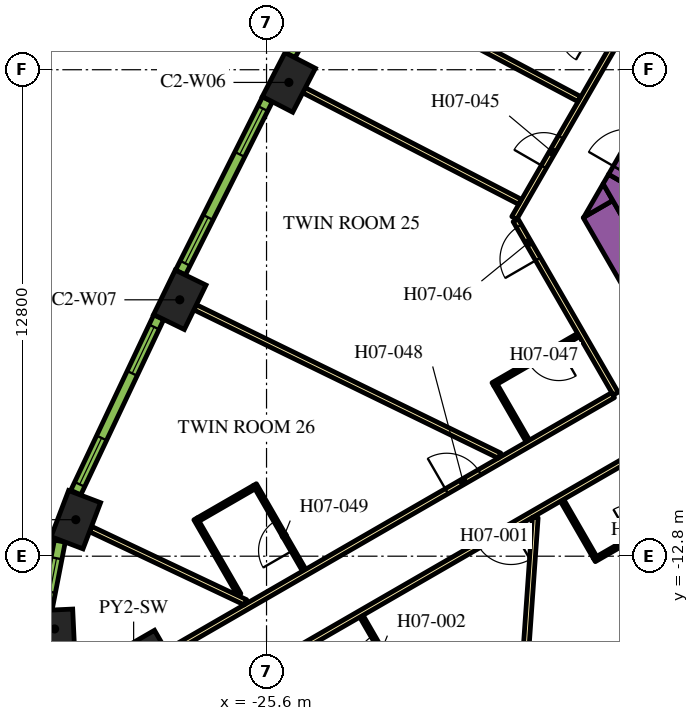
"""IFC4 building model, lengths in metres.
Left out: names, types, materials, properties, quantities, classifications, styles, units other than length and angle.
Written with IfcOpenShell. Run it as: python <this file> out.ifc"""

import sys

from ifc_helpers import new_model, si_unit, direction, frame, frame_2d, origin, origin_2d, place, context, subcontext, project, spatial, polyline, rectangle, outline, extrude, element, fill, save


model = new_model("IFC4")
c1 = context("Model", 3, precision=1e-05, world=origin(), true_north=direction((0.0, 1.0)))
c2 = subcontext(c1, "Body", "Model", "MODEL_VIEW")
j1 = project(units=[si_unit("LENGTHUNIT", "METRE"), si_unit("PLANEANGLEUNIT", "RADIAN")], contexts=[c1])
p1 = place(None, origin())
s1 = spatial("IfcSite", under=j1, at=p1, CompositionType="ELEMENT")
p2 = place(p1, origin())
s2 = spatial("IfcBuilding", under=s1, at=p2, CompositionType="ELEMENT")
p3 = place(p2, frame((0.0, 0.0, 99.3)))
s3 = spatial("IfcBuildingStorey", under=s2, at=p3, CompositionType="ELEMENT", Elevation=99.3)
p4 = place(p3, frame((-29.097, -16.799, 0.0), z_axis=(0.0, 0.0, 1.0), x_axis=(-0.866025403784, -0.5, 0.0)))
e1 = element("IfcColumn", 1, at=p4, inside=s3, PredefinedType="COLUMN", context=c2, shape_type="SweptSolid", body=[
    extrude(rectangle(XDim=3.0, YDim=3.0, at=origin_2d()), origin(), (0.0, 0.0, 1.0), 3.9),
])
for number, where, z_axis, x_axis in (
    (2, (-25.012, -0.334, 0.0), (0.0, 0.0, 1.0), (-0.459, -0.888, 0.0)),
    (3, (-27.883, -6.054, 0.0), (0.0, 0.0, 1.0), (-0.438, -0.899, 0.0)),
    (4, (-30.619, -11.839, 0.0), (0.0, 0.0, 1.0), (-0.355, -0.935, 0.0)),
):
    element("IfcColumn", number, at=place(p3, frame(where, z_axis=z_axis, x_axis=x_axis)), inside=s3, PredefinedType="COLUMN", context=c2, shape_type="SweptSolid", body=[
        extrude(rectangle(XDim=1.3, YDim=0.9, at=origin_2d()), origin(), (0.0, 0.0, 1.0), 3.9),
    ])
p5 = place(p3, frame((-31.177, -14.714, 0.0), z_axis=(0.0, 0.0, 1.0), x_axis=(0.046756026083, -0.998906338965, 0.0)))
e5 = element("IfcColumn", 5, at=p5, inside=s3, PredefinedType="COLUMN", context=c2, shape_type="SweptSolid", body=[
    extrude(rectangle(XDim=1.0, YDim=1.0, at=origin_2d()), origin(), (0.0, 0.0, 1.0), 3.9),
])
p6 = place(p3, frame((-12.134, -11.883, 0.0), z_axis=(0.0, 0.0, 1.0), x_axis=(-0.500005339912, 0.866022320763, 0.0)))
e6 = element("IfcWall", 6, at=p6, inside=s3, PredefinedType="SOLIDWALL", context=c2, shape_type="SweptSolid", body=[
    extrude(rectangle(XDim=9.488, YDim=0.9, at=frame_2d((4.744, 0.0))), origin(), (0.0, 0.0, 1.0), 3.9),
])
p7 = place(p3, origin())
e7 = element("IfcWall", 7, at=p7, inside=s3, PredefinedType="SOLIDWALL", context=c2, shape_type="SweptSolid", body=[
    extrude(outline(polyline([(-16.489, -3.44), (-17.251, -3.88), (-16.743, -3.0), (-16.489, -3.44)])), origin(), (0.0, 0.0, 1.0), 3.9),
])
e8 = element("IfcWall", 8, at=p7, inside=s3, PredefinedType="SOLIDWALL", context=c2, shape_type="SweptSolid", body=[
    extrude(outline(polyline([(-15.82, -3.201), (-16.223, -3.9), (-16.743, -3.0), (-16.599, -2.751), (-15.82, -3.201)])), origin(), (0.0, 0.0, 1.0), 3.9),
])
p8 = place(p3, frame((-16.209, -2.976, 0.0), z_axis=(0.0, 0.0, 1.0), x_axis=(0.499954529098, 0.86605165483, 0.0)))
e9 = element("IfcWall", 9, at=p8, inside=s3, PredefinedType="SOLIDWALL", context=c2, shape_type="SweptSolid", body=[
    extrude(rectangle(XDim=1.7, YDim=0.9, at=frame_2d((0.85, 0.0))), origin(), (0.0, 0.0, 1.0), 3.9),
])
p9 = place(p8, frame((0.25, 0.0, 0.0)))
e10 = element("IfcOpeningElement", 10, at=p9, cuts=e9, PredefinedType="OPENING", context=c2, shape_type="SweptSolid", body=[
    extrude(rectangle(XDim=1.2, YDim=2.1, at=frame_2d((0.6, 1.05))), frame((0.0, 0.46, 0.0), z_axis=(0.0, -1.0, 0.0), x_axis=(1.0, 0.0, 0.0)), (0.0, 0.0, 1.0), 0.92),
])
p10 = place(p3, frame((-19.081, -3.9, 0.0), z_axis=(0.0, 0.0, 1.0), x_axis=(0.499998313975, 0.866026377209, 0.0)))
e11 = element("IfcWall", 11, at=p10, inside=s3, PredefinedType="PARTITIONING", context=c2, shape_type="SweptSolid", body=[
    extrude(rectangle(XDim=25.766, YDim=0.15, at=frame_2d((12.883, 0.0))), origin(), (0.0, 0.0, 1.0), 2.75),
])
p11 = place(p10, frame((19.306, 0.0, 0.0)))
e12 = element("IfcOpeningElement", 12, at=p11, cuts=e11, PredefinedType="OPENING", context=c2, shape_type="SweptSolid", body=[
    extrude(rectangle(XDim=1.0, YDim=2.1, at=frame_2d((0.5, 1.05))), frame((0.0, 0.085, 0.0), z_axis=(0.0, -1.0, 0.0), x_axis=(1.0, 0.0, 0.0)), (0.0, 0.0, 1.0), 0.17),
])
p12 = place(p10, frame((17.144, 0.0, 0.0)))
e13 = element("IfcOpeningElement", 13, at=p12, cuts=e11, PredefinedType="OPENING", context=c2, shape_type="SweptSolid", body=[
    extrude(rectangle(XDim=0.9, YDim=2.1, at=frame_2d((0.45, 1.05))), frame((0.0, 0.085, 0.0), z_axis=(0.0, -1.0, 0.0), x_axis=(1.0, 0.0, 0.0)), (0.0, 0.0, 1.0), 0.17),
])
p13 = place(p10, frame((9.955, 0.0, 0.0)))
e14 = element("IfcOpeningElement", 14, at=p13, cuts=e11, PredefinedType="OPENING", context=c2, shape_type="SweptSolid", body=[
    extrude(rectangle(XDim=1.1, YDim=2.1, at=frame_2d((0.55, 1.05))), frame((0.0, 0.085, 0.0), z_axis=(0.0, -1.0, 0.0), x_axis=(1.0, 0.0, 0.0)), (0.0, 0.0, 1.0), 0.17),
])
p14 = place(p10, frame((8.648, 0.0, 0.0)))
e15 = element("IfcOpeningElement", 15, at=p14, cuts=e11, PredefinedType="OPENING", context=c2, shape_type="SweptSolid", body=[
    extrude(rectangle(XDim=1.0, YDim=2.1, at=frame_2d((0.5, 1.05))), frame((0.0, 0.085, 0.0), z_axis=(0.0, -1.0, 0.0), x_axis=(1.0, 0.0, 0.0)), (0.0, 0.0, 1.0), 0.17),
])
p15 = place(p10, frame((1.553, 0.0, 0.0)))
e16 = element("IfcOpeningElement", 16, at=p15, cuts=e11, PredefinedType="OPENING", context=c2, shape_type="SweptSolid", body=[
    extrude(rectangle(XDim=0.9, YDim=2.1, at=frame_2d((0.45, 1.05))), frame((0.0, 0.085, 0.0), z_axis=(0.0, -1.0, 0.0), x_axis=(1.0, 0.0, 0.0)), (0.0, 0.0, 1.0), 0.17),
])
p16 = place(p3, frame((-16.412, -8.523, 0.0), z_axis=(0.0, 0.0, 1.0), x_axis=(-0.500001929737, 0.866024289647, 0.0)))
e17 = element("IfcWall", 17, at=p16, inside=s3, PredefinedType="PARTITIONING", context=c2, shape_type="SweptSolid", body=[
    extrude(rectangle(XDim=5.268, YDim=0.15, at=frame_2d((2.634, 0.0))), origin(), (0.0, 0.0, 1.0), 2.75),
])
p17 = place(p16, frame((4.088, 0.0, 0.0)))
e18 = element("IfcOpeningElement", 18, at=p17, cuts=e17, PredefinedType="OPENING", context=c2, shape_type="SweptSolid", body=[
    extrude(rectangle(XDim=1.0, YDim=2.1, at=frame_2d((0.5, 1.05))), frame((0.0, 0.085, 0.0), z_axis=(0.0, -1.0, 0.0), x_axis=(1.0, 0.0, 0.0)), (0.0, 0.0, 1.0), 0.17),
])
p18 = place(p3, frame((-28.211, -15.335, 0.0), z_axis=(0.0, 0.0, 1.0), x_axis=(0.866025884867, 0.49999916674, 0.0)))
e19 = element("IfcWall", 19, at=p18, inside=s3, PredefinedType="PARTITIONING", context=c2, shape_type="SweptSolid", body=[
    extrude(rectangle(XDim=13.543, YDim=0.15, at=frame_2d((6.772, 0.0))), origin(), (0.0, 0.0, 1.0), 2.75),
])
p19 = place(p18, frame((8.488, 0.0, 0.0)))
e20 = element("IfcOpeningElement", 20, at=p19, cuts=e19, PredefinedType="OPENING", context=c2, shape_type="SweptSolid", body=[
    extrude(rectangle(XDim=1.0, YDim=2.1, at=frame_2d((0.5, 1.05))), frame((0.0, 0.085, 0.0), z_axis=(0.0, -1.0, 0.0), x_axis=(1.0, 0.0, 0.0)), (0.0, 0.0, 1.0), 0.17),
])
p20 = place(p3, frame((-15.587, -9.952, 0.0), z_axis=(0.0, 0.0, 1.0), x_axis=(-0.866017869832, -0.500013048961, 0.0)))
e21 = element("IfcWall", 21, at=p20, inside=s3, PredefinedType="PARTITIONING", context=c2, shape_type="SweptSolid", body=[
    extrude(rectangle(XDim=13.624, YDim=0.15, at=frame_2d((6.812, 0.0))), origin(), (0.0, 0.0, 1.0), 2.75),
])
p21 = place(p20, frame((4.134, 0.0, 0.0)))
e22 = element("IfcOpeningElement", 22, at=p21, cuts=e21, PredefinedType="OPENING", context=c2, shape_type="SweptSolid", body=[
    extrude(rectangle(XDim=1.0, YDim=2.1, at=frame_2d((0.5, 1.05))), frame((0.0, 0.085, 0.0), z_axis=(0.0, -1.0, 0.0), x_axis=(1.0, 0.0, 0.0)), (0.0, 0.0, 1.0), 0.17),
])
p22 = place(p3, frame((-30.231, -12.085, 0.0), z_axis=(0.0, 0.0, 1.0), x_axis=(0.904001132572, -0.427530060122, 0.0)))
e23 = element("IfcWall", 23, at=p22, inside=s3, PredefinedType="PARTITIONING", context=c2, shape_type="SweptSolid", body=[
    extrude(rectangle(XDim=4.51, YDim=0.15, at=frame_2d((2.255, 0.0))), origin(), (0.0, 0.0, 1.0), 2.75),
])
p23 = place(p3, frame((-27.479, -6.251, 0.0), z_axis=(0.0, 0.0, 1.0), x_axis=(0.898945877276, -0.438059710231, 0.0)))
e24 = element("IfcWall", 24, at=p23, inside=s3, PredefinedType="PARTITIONING", context=c2, shape_type="SweptSolid", body=[
    extrude(rectangle(XDim=8.909, YDim=0.15, at=frame_2d((4.455, 0.0))), origin(), (0.0, 0.0, 1.0), 2.75),
])
p24 = place(p3, frame((-24.613, -0.541, 0.0), z_axis=(0.0, 0.0, 1.0), x_axis=(0.888459912519, -0.458954228487, 0.0)))
e25 = element("IfcWall", 25, at=p24, inside=s3, PredefinedType="PARTITIONING", context=c2, shape_type="SweptSolid", body=[
    extrude(rectangle(XDim=6.392, YDim=0.15, at=frame_2d((3.196, 0.0))), origin(), (0.0, 0.0, 1.0), 2.75),
])
p25 = place(p3, frame((-19.153, -20.671, 0.0), z_axis=(0.0, 0.0, 1.0), x_axis=(0.070070736723, 0.997542025107, 0.0)))
e26 = element("IfcWall", 26, at=p25, inside=s3, PredefinedType="PARTITIONING", context=c2, shape_type="SweptSolid", body=[
    extrude(rectangle(XDim=8.909, YDim=0.15, at=frame_2d((4.455, 0.0))), origin(), (0.0, 0.0, 1.0), 2.75),
])
p26 = place(p3, frame((-23.652, 2.567, 0.0), z_axis=(0.0, 0.0, 1.0), x_axis=(0.883019237957, -0.469336793144, 0.0)))
e27 = element("IfcWall", 27, at=p26, inside=s3, PredefinedType="PARTITIONING", context=c2, shape_type="SweptSolid", body=[
    extrude(rectangle(XDim=7.111, YDim=0.15, at=frame_2d((3.555, 0.0))), origin(), (0.0, 0.0, 1.0), 2.75),
])
p27 = place(p3, frame((-21.704, -16.803, 0.0), z_axis=(0.0, 0.0, 1.0), x_axis=(-0.500049511043, 0.865996816683, 0.0)))
e28 = element("IfcWall", 28, at=p27, inside=s3, PredefinedType="PARTITIONING", context=c2, shape_type="SweptSolid", body=[
    extrude(rectangle(XDim=2.8, YDim=0.1, at=frame_2d((1.4, 0.0))), origin(), (0.0, 0.0, 1.0), 2.75),
])
p28 = place(p27, frame((1.3, 0.0, 0.0)))
e29 = element("IfcOpeningElement", 29, at=p28, cuts=e28, PredefinedType="OPENING", context=c2, shape_type="SweptSolid", body=[
    extrude(rectangle(XDim=0.9, YDim=2.1, at=frame_2d((0.45, 1.05))), frame((0.0, 0.06, 0.0), z_axis=(0.0, -1.0, 0.0), x_axis=(1.0, 0.0, 0.0)), (0.0, 0.0, 1.0), 0.12),
])
p29 = place(p3, frame((-16.974, -12.9, 0.0), z_axis=(0.0, 0.0, 1.0), x_axis=(0.865997922154, 0.500047596559, 0.0)))
e30 = element("IfcWall", 30, at=p29, inside=s3, PredefinedType="PARTITIONING", context=c2, shape_type="SweptSolid", body=[
    extrude(rectangle(XDim=2.6, YDim=0.1, at=frame_2d((1.3, 0.0))), origin(), (0.0, 0.0, 1.0), 2.75),
])
p30 = place(p29, frame((1.1, 0.0, 0.0)))
e31 = element("IfcOpeningElement", 31, at=p30, cuts=e30, PredefinedType="OPENING", context=c2, shape_type="SweptSolid", body=[
    extrude(rectangle(XDim=0.9, YDim=2.1, at=frame_2d((0.45, 1.05))), frame((0.0, 0.06, 0.0), z_axis=(0.0, -1.0, 0.0), x_axis=(1.0, 0.0, 0.0)), (0.0, 0.0, 1.0), 0.12),
])
p31 = place(p3, frame((-16.956, -12.832, 0.0), z_axis=(0.0, 0.0, 1.0), x_axis=(-0.499978980201, 0.866037539231, 0.0)))
e32 = element("IfcWall", 32, at=p31, inside=s3, PredefinedType="PARTITIONING", context=c2, shape_type="SweptSolid", body=[
    extrude(rectangle(XDim=1.73, YDim=0.1, at=frame_2d((0.865, 0.0))), origin(), (0.0, 0.0, 1.0), 2.75),
])
p32 = place(p3, frame((-17.39, -6.979, 0.0), z_axis=(0.0, 0.0, 1.0), x_axis=(-0.866021400173, -0.500006934395, 0.0)))
e33 = element("IfcWall", 33, at=p32, inside=s3, PredefinedType="PARTITIONING", context=c2, shape_type="SweptSolid", body=[
    extrude(rectangle(XDim=2.6, YDim=0.1, at=frame_2d((1.3, 0.0))), origin(), (0.0, 0.0, 1.0), 2.75),
])
p33 = place(p32, frame((0.6, 0.0, 0.0)))
e34 = element("IfcOpeningElement", 34, at=p33, cuts=e33, PredefinedType="OPENING", context=c2, shape_type="SweptSolid", body=[
    extrude(rectangle(XDim=0.9, YDim=2.1, at=frame_2d((0.45, 1.05))), frame((0.0, 0.06, 0.0), z_axis=(0.0, -1.0, 0.0), x_axis=(1.0, 0.0, 0.0)), (0.0, 0.0, 1.0), 0.12),
])
p34 = place(p3, frame((-19.574, -8.297, 0.0), z_axis=(0.0, 0.0, 1.0), x_axis=(0.500062241894, -0.865989465428, 0.0)))
e35 = element("IfcWall", 35, at=p34, inside=s3, PredefinedType="PARTITIONING", context=c2, shape_type="SweptSolid", body=[
    extrude(rectangle(XDim=1.7, YDim=0.1, at=frame_2d((0.85, 0.0))), origin(), (0.0, 0.0, 1.0), 2.75),
])
p35 = place(p3, frame((-24.61, -13.169, 0.0), z_axis=(0.0, 0.0, 1.0), x_axis=(-0.500006934395, 0.866021400173, 0.0)))
e36 = element("IfcWall", 36, at=p35, inside=s3, PredefinedType="PARTITIONING", context=c2, shape_type="SweptSolid", body=[
    extrude(rectangle(XDim=2.6, YDim=0.1, at=frame_2d((1.3, 0.0))), origin(), (0.0, 0.0, 1.0), 2.75),
])
p36 = place(p35, frame((0.6, 0.0, 0.0)))
e37 = element("IfcOpeningElement", 37, at=p36, cuts=e36, PredefinedType="OPENING", context=c2, shape_type="SweptSolid", body=[
    extrude(rectangle(XDim=0.9, YDim=2.1, at=frame_2d((0.45, 1.05))), frame((0.0, 0.06, 0.0), z_axis=(0.0, -1.0, 0.0), x_axis=(1.0, 0.0, 0.0)), (0.0, 0.0, 1.0), 0.12),
])
p37 = place(p3, frame((-25.928, -10.986, 0.0), z_axis=(0.0, 0.0, 1.0), x_axis=(-0.865989465428, -0.500062241894, 0.0)))
e38 = element("IfcWall", 38, at=p37, inside=s3, PredefinedType="PARTITIONING", context=c2, shape_type="SweptSolid", body=[
    extrude(rectangle(XDim=1.7, YDim=0.1, at=frame_2d((0.85, 0.0))), origin(), (0.0, 0.0, 1.0), 2.75),
])
p38 = place(p3, frame((-26.319, -13.81, 0.0), z_axis=(0.0, 0.0, 1.0), x_axis=(-0.499952165731, 0.866053019151, 0.0)))
e39 = element("IfcWall", 39, at=p38, inside=s3, PredefinedType="PARTITIONING", context=c2, shape_type="SweptSolid", body=[
    extrude(rectangle(XDim=2.3, YDim=0.1, at=frame_2d((1.15, 0.0))), origin(), (0.0, 0.0, 1.0), 2.75),
])
p39 = place(p3, frame((-22.583, 4.887, 0.0), z_axis=(0.0, 0.0, 1.0), x_axis=(-0.469323203119, -0.883026461106, 0.0)))
e40 = element("IfcWall", 40, at=p39, inside=s3, PredefinedType="SOLIDWALL", context=c2, shape_type="SweptSolid", body=[
    extrude(rectangle(XDim=5.101, YDim=0.29, at=frame_2d((2.55, 0.0))), origin(), (0.0, 0.0, 1.0), 3.65),
])
p40 = place(p39, frame((0.273, 0.0, 0.9)))
e41 = element("IfcOpeningElement", 41, at=p40, cuts=e40, PredefinedType="OPENING", context=c2, shape_type="SweptSolid", body=[
    extrude(rectangle(XDim=1.35, YDim=2.15, at=frame_2d((0.675, 1.075))), frame((0.0, 0.155, 0.0), z_axis=(0.0, -1.0, 0.0), x_axis=(1.0, 0.0, 0.0)), (0.0, 0.0, 1.0), 0.31),
])
p41 = place(p39, frame((3.478, 0.0, 0.9)))
e42 = element("IfcOpeningElement", 42, at=p41, cuts=e40, PredefinedType="OPENING", context=c2, shape_type="SweptSolid", body=[
    extrude(rectangle(XDim=1.35, YDim=2.15, at=frame_2d((0.675, 1.075))), frame((0.0, 0.155, 0.0), z_axis=(0.0, -1.0, 0.0), x_axis=(1.0, 0.0, 0.0)), (0.0, 0.0, 1.0), 0.31),
])
p42 = place(p3, frame((-25.576, -0.778, 0.0), z_axis=(0.0, 0.0, 1.0), x_axis=(-0.448534297211, -0.893765620409, 0.0)))
e43 = element("IfcWall", 43, at=p42, inside=s3, PredefinedType="SOLIDWALL", context=c2, shape_type="SweptSolid", body=[
    extrude(rectangle(XDim=5.1, YDim=0.29, at=frame_2d((2.55, 0.0))), origin(), (0.0, 0.0, 1.0), 3.65),
])
p43 = place(p42, frame((0.272, 0.0, 0.9)))
e44 = element("IfcOpeningElement", 44, at=p43, cuts=e43, PredefinedType="OPENING", context=c2, shape_type="SweptSolid", body=[
    extrude(rectangle(XDim=1.35, YDim=2.15, at=frame_2d((0.675, 1.075))), frame((0.0, 0.155, 0.0), z_axis=(0.0, -1.0, 0.0), x_axis=(1.0, 0.0, 0.0)), (0.0, 0.0, 1.0), 0.31),
])
p44 = place(p42, frame((3.478, 0.0, 0.9)))
e45 = element("IfcOpeningElement", 45, at=p44, cuts=e43, PredefinedType="OPENING", context=c2, shape_type="SweptSolid", body=[
    extrude(rectangle(XDim=1.35, YDim=2.15, at=frame_2d((0.675, 1.075))), frame((0.0, 0.155, 0.0), z_axis=(0.0, -1.0, 0.0), x_axis=(1.0, 0.0, 0.0)), (0.0, 0.0, 1.0), 0.31),
])
p45 = place(p3, frame((-28.436, -6.511, 0.0), z_axis=(0.0, 0.0, 1.0), x_axis=(-0.427543726596, -0.903994669148, 0.0)))
e46 = element("IfcWall", 46, at=p45, inside=s3, PredefinedType="SOLIDWALL", context=c2, shape_type="SweptSolid", body=[
    extrude(rectangle(XDim=5.107, YDim=0.29, at=frame_2d((2.553, 0.0))), origin(), (0.0, 0.0, 1.0), 3.65),
])
p46 = place(p45, frame((0.285, 0.0, 0.9)))
e47 = element("IfcOpeningElement", 47, at=p46, cuts=e46, PredefinedType="OPENING", context=c2, shape_type="SweptSolid", body=[
    extrude(rectangle(XDim=1.35, YDim=2.15, at=frame_2d((0.675, 1.075))), frame((0.0, 0.155, 0.0), z_axis=(0.0, -1.0, 0.0), x_axis=(1.0, 0.0, 0.0)), (0.0, 0.0, 1.0), 0.31),
])
p47 = place(p45, frame((3.516, 0.0, 0.9)))
e48 = element("IfcOpeningElement", 48, at=p47, cuts=e46, PredefinedType="OPENING", context=c2, shape_type="SweptSolid", body=[
    extrude(rectangle(XDim=1.35, YDim=2.15, at=frame_2d((0.675, 1.075))), frame((0.0, 0.155, 0.0), z_axis=(0.0, -1.0, 0.0), x_axis=(1.0, 0.0, 0.0)), (0.0, 0.0, 1.0), 0.31),
])
p48 = place(p3, frame((-31.039, -12.403, 0.0), z_axis=(0.0, 0.0, 1.0), x_axis=(-0.190409913989, -0.981704672829, 0.0)))
e49 = element("IfcWall", 49, at=p48, inside=s3, PredefinedType="SOLIDWALL", context=c2, shape_type="SweptSolid", body=[
    extrude(rectangle(XDim=1.819, YDim=0.29, at=frame_2d((0.91, 0.0))), origin(), (0.0, 0.0, 1.0), 3.65),
])
p49 = place(p48, frame((0.46, 0.0, 0.9)))
e50 = element("IfcOpeningElement", 50, at=p49, cuts=e49, PredefinedType="OPENING", context=c2, shape_type="SweptSolid", body=[
    extrude(rectangle(XDim=0.9, YDim=2.15, at=frame_2d((0.45, 1.075))), frame((0.0, 0.155, 0.0), z_axis=(0.0, -1.0, 0.0), x_axis=(1.0, 0.0, 0.0)), (0.0, 0.0, 1.0), 0.31),
])
p50 = place(p21, origin())
e51 = element("IfcDoor", 51, at=p50, inside=s3, OperationType="SINGLE_SWING_LEFT", PredefinedType="DOOR", context=c2, shape_type="SweptSolid", body=[
    extrude(rectangle(XDim=1.0, YDim=2.1, at=frame_2d((0.5, 1.05))), frame((0.0, 0.025, 0.0), z_axis=(0.0, -1.0, 0.0), x_axis=(1.0, 0.0, 0.0)), (0.0, 0.0, 1.0), 0.05),
])
fill(e22, e51)
p51 = place(p28, origin())
e52 = element("IfcDoor", 52, at=p51, inside=s3, OperationType="SINGLE_SWING_LEFT", PredefinedType="DOOR", context=c2, shape_type="SweptSolid", body=[
    extrude(rectangle(XDim=0.9, YDim=2.1, at=frame_2d((0.45, 1.05))), frame((0.0, 0.025, 0.0), z_axis=(0.0, -1.0, 0.0), x_axis=(1.0, 0.0, 0.0)), (0.0, 0.0, 1.0), 0.05),
])
fill(e29, e52)
p52 = place(p15, origin())
e53 = element("IfcDoor", 53, at=p52, inside=s3, OperationType="SINGLE_SWING_RIGHT", PredefinedType="DOOR", context=c2, shape_type="SweptSolid", body=[
    extrude(rectangle(XDim=0.9, YDim=2.1, at=frame_2d((0.45, 1.05))), frame((0.0, 0.025, 0.0), z_axis=(0.0, -1.0, 0.0), x_axis=(1.0, 0.0, 0.0)), (0.0, 0.0, 1.0), 0.05),
])
fill(e16, e53)
p53 = place(p17, origin())
e54 = element("IfcDoor", 54, at=p53, inside=s3, OperationType="SINGLE_SWING_RIGHT", PredefinedType="DOOR", context=c2, shape_type="SweptSolid", body=[
    extrude(rectangle(XDim=1.0, YDim=2.1, at=frame_2d((0.5, 1.05))), frame((0.0, 0.025, 0.0), z_axis=(0.0, -1.0, 0.0), x_axis=(1.0, 0.0, 0.0)), (0.0, 0.0, 1.0), 0.05),
])
fill(e18, e54)
p54 = place(p33, origin())
e55 = element("IfcDoor", 55, at=p54, inside=s3, OperationType="SINGLE_SWING_LEFT", PredefinedType="DOOR", context=c2, shape_type="SweptSolid", body=[
    extrude(rectangle(XDim=0.9, YDim=2.1, at=frame_2d((0.45, 1.05))), frame((0.0, 0.025, 0.0), z_axis=(0.0, -1.0, 0.0), x_axis=(1.0, 0.0, 0.0)), (0.0, 0.0, 1.0), 0.05),
])
fill(e34, e55)
p55 = place(p19, origin())
e56 = element("IfcDoor", 56, at=p55, inside=s3, OperationType="SINGLE_SWING_RIGHT", PredefinedType="DOOR", context=c2, shape_type="SweptSolid", body=[
    extrude(rectangle(XDim=1.0, YDim=2.1, at=frame_2d((0.5, 1.05))), frame((0.0, 0.025, 0.0), z_axis=(0.0, -1.0, 0.0), x_axis=(1.0, 0.0, 0.0)), (0.0, 0.0, 1.0), 0.05),
])
fill(e20, e56)
p56 = place(p36, origin())
e57 = element("IfcDoor", 57, at=p56, inside=s3, OperationType="SINGLE_SWING_LEFT", PredefinedType="DOOR", context=c2, shape_type="SweptSolid", body=[
    extrude(rectangle(XDim=0.9, YDim=2.1, at=frame_2d((0.45, 1.05))), frame((0.0, 0.025, 0.0), z_axis=(0.0, -1.0, 0.0), x_axis=(1.0, 0.0, 0.0)), (0.0, 0.0, 1.0), 0.05),
])
fill(e37, e57)
p57 = place(p43, origin())
e58 = element("IfcWindow", 58, at=p57, inside=s3, PartitioningType="DOUBLE_PANEL_VERTICAL", PredefinedType="WINDOW", context=c2, shape_type="SweptSolid", body=[
    extrude(rectangle(XDim=1.35, YDim=2.15, at=frame_2d((0.675, 1.075))), frame((0.0, 0.015, 0.0), z_axis=(0.0, -1.0, 0.0), x_axis=(1.0, 0.0, 0.0)), (0.0, 0.0, 1.0), 0.06),
])
fill(e44, e58)
p58 = place(p44, origin())
e59 = element("IfcWindow", 59, at=p58, inside=s3, PartitioningType="DOUBLE_PANEL_VERTICAL", PredefinedType="WINDOW", context=c2, shape_type="SweptSolid", body=[
    extrude(rectangle(XDim=1.35, YDim=2.15, at=frame_2d((0.675, 1.075))), frame((0.0, 0.015, 0.0), z_axis=(0.0, -1.0, 0.0), x_axis=(1.0, 0.0, 0.0)), (0.0, 0.0, 1.0), 0.06),
])
fill(e45, e59)
p59 = place(p46, origin())
e60 = element("IfcWindow", 60, at=p59, inside=s3, PartitioningType="DOUBLE_PANEL_VERTICAL", PredefinedType="WINDOW", context=c2, shape_type="SweptSolid", body=[
    extrude(rectangle(XDim=1.35, YDim=2.15, at=frame_2d((0.675, 1.075))), frame((0.0, 0.015, 0.0), z_axis=(0.0, -1.0, 0.0), x_axis=(1.0, 0.0, 0.0)), (0.0, 0.0, 1.0), 0.06),
])
fill(e47, e60)
p60 = place(p47, origin())
e61 = element("IfcWindow", 61, at=p60, inside=s3, PartitioningType="DOUBLE_PANEL_VERTICAL", PredefinedType="WINDOW", context=c2, shape_type="SweptSolid", body=[
    extrude(rectangle(XDim=1.35, YDim=2.15, at=frame_2d((0.675, 1.075))), frame((0.0, 0.015, 0.0), z_axis=(0.0, -1.0, 0.0), x_axis=(1.0, 0.0, 0.0)), (0.0, 0.0, 1.0), 0.06),
])
fill(e48, e61)
p61 = place(p49, origin())
e62 = element("IfcWindow", 62, at=p61, inside=s3, PartitioningType="SINGLE_PANEL", PredefinedType="WINDOW", context=c2, shape_type="SweptSolid", body=[
    extrude(rectangle(XDim=0.9, YDim=2.15, at=frame_2d((0.45, 1.075))), frame((0.0, 0.015, 0.0), z_axis=(0.0, -1.0, 0.0), x_axis=(1.0, 0.0, 0.0)), (0.0, 0.0, 1.0), 0.06),
])
fill(e50, e62)
save(model, sys.argv[1])
